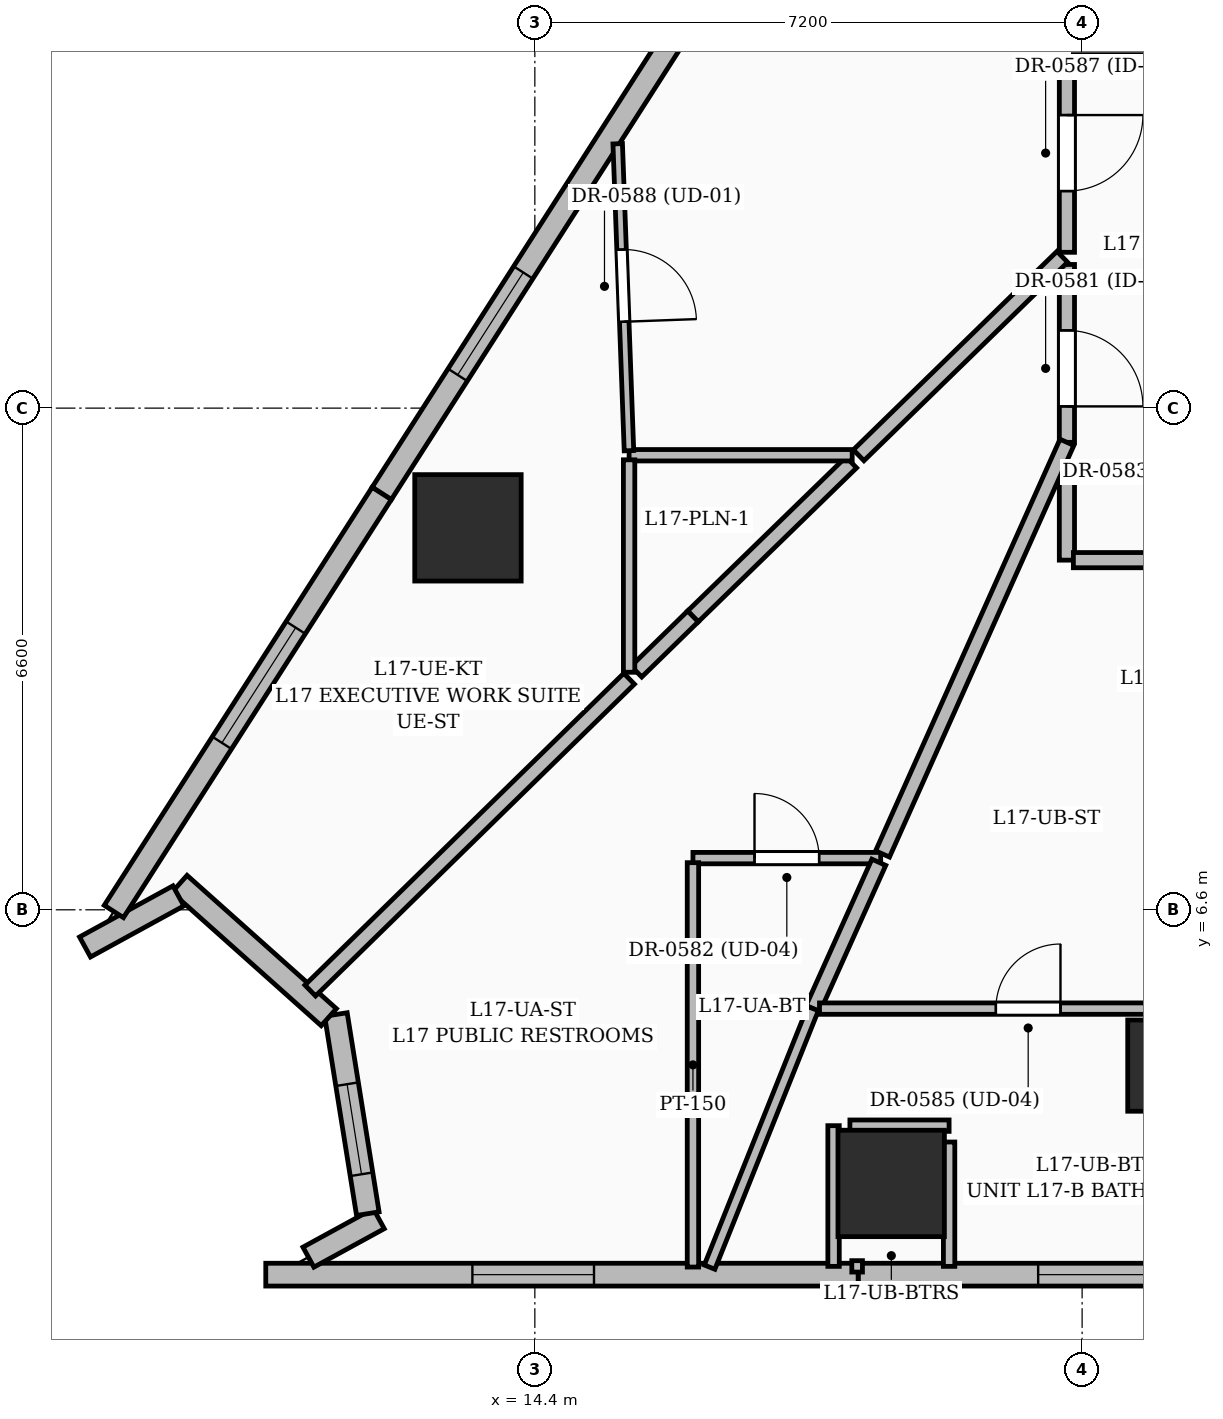
"""IFC4 building model, lengths in metres.
Left out: names, types, materials, properties, quantities, classifications, styles, units other than length and angle.
Written with IfcOpenShell. Run it as: python <this file> out.ifc"""

import sys

from ifc_helpers import new_model, si_unit, direction, frame, frame_2d, origin, origin_2d, place, context, subcontext, project, spatial, rectangle, extrude, element, fill, save


model = new_model("IFC4")
c1 = context("Model", 3, precision=1e-05, world=origin(), true_north=direction((0.0, 1.0)))
c2 = subcontext(c1, "Body", "Model", "MODEL_VIEW")
j1 = project(units=[si_unit("LENGTHUNIT", "METRE"), si_unit("PLANEANGLEUNIT", "RADIAN")], contexts=[c1])
p1 = place(None, origin())
s1 = spatial("IfcSite", under=j1, at=p1, CompositionType="ELEMENT")
p2 = place(p1, origin())
s2 = spatial("IfcBuilding", under=s1, at=p2, CompositionType="ELEMENT")
p3 = place(p2, frame((0.0, 0.0, 71.4)))
s3 = spatial("IfcBuildingStorey", under=s2, at=p3, CompositionType="ELEMENT", Elevation=71.4)
p4 = place(p3, frame((22.8, 4.55, 0.0), z_axis=(0.0, 0.0, 1.0), x_axis=(1.0, 0.0, 0.0)))
e1 = element("IfcColumn", 1, at=p4, inside=s3, PredefinedType="COLUMN", context=c2, shape_type="SweptSolid", body=[
    extrude(rectangle(XDim=1.2, YDim=1.2, at=origin_2d()), origin(), (0.0, 0.0, 1.0), 3.6),
])
for number, where, z_axis, x_axis in (
    (2, (19.088, 3.0, 0.0), (0.0, 0.0, 1.0), (1.0, 0.0, 0.0)),
    (3, (13.52, 11.625, 0.0), (0.0, 0.0, 1.0), (1.0, 0.0, 0.0)),
):
    element("IfcColumn", number, at=place(p3, frame(where, z_axis=z_axis, x_axis=x_axis)), inside=s3, PredefinedType="COLUMN", context=c2, shape_type="SweptSolid", body=[
        extrude(rectangle(XDim=1.4, YDim=1.4, at=origin_2d()), origin(), (0.0, 0.0, 1.0), 3.6),
    ])
p5 = place(p3, frame((26.447, 1.8, 0.0), z_axis=(0.0, 0.0, 1.0), x_axis=(-1.0, 0.0, 0.0)))
e4 = element("IfcWall", 4, at=p5, inside=s3, PredefinedType="SOLIDWALL", context=c2, shape_type="SweptSolid", body=[
    extrude(rectangle(XDim=7.793, YDim=0.3, at=frame_2d((3.897, 0.0))), origin(), (0.0, 0.0, 1.0), 3.35),
])
p6 = place(p5, frame((3.625, 0.0, 0.6)))
e5 = element("IfcOpeningElement", 5, at=p6, cuts=e4, PredefinedType="OPENING", context=c2, shape_type="SweptSolid", body=[
    extrude(rectangle(XDim=1.8, YDim=2.1, at=frame_2d((0.9, 1.05))), frame((0.0, 0.16, 0.0), z_axis=(0.0, -1.0, 0.0), x_axis=(1.0, 0.0, 0.0)), (0.0, 0.0, 1.0), 0.32),
])
p7 = place(p5, frame((0.6, 0.0, 0.55)))
e6 = element("IfcOpeningElement", 6, at=p7, cuts=e4, PredefinedType="OPENING", context=c2, shape_type="SweptSolid", body=[
    extrude(rectangle(XDim=1.6, YDim=2.2, at=frame_2d((0.8, 1.1))), frame((0.0, 0.16, 0.0), z_axis=(0.0, -1.0, 0.0), x_axis=(1.0, 0.0, 0.0)), (0.0, 0.0, 1.0), 0.32),
])
p8 = place(p3, frame((18.653, 1.8, 0.0), z_axis=(0.0, 0.0, 1.0), x_axis=(-1.0, 0.0, 0.0)))
e7 = element("IfcWall", 7, at=p8, inside=s3, PredefinedType="SOLIDWALL", context=c2, shape_type="SweptSolid", body=[
    extrude(rectangle(XDim=7.793, YDim=0.3, at=frame_2d((3.896, 0.0))), origin(), (0.0, 0.0, 1.0), 3.35),
])
p9 = place(p8, frame((3.475, 0.0, 0.55)))
e8 = element("IfcOpeningElement", 8, at=p9, cuts=e7, PredefinedType="OPENING", context=c2, shape_type="SweptSolid", body=[
    extrude(rectangle(XDim=1.6, YDim=2.2, at=frame_2d((0.8, 1.1))), frame((0.0, 0.16, 0.0), z_axis=(0.0, -1.0, 0.0), x_axis=(1.0, 0.0, 0.0)), (0.0, 0.0, 1.0), 0.32),
])
p10 = place(p3, frame((11.421, 2.03, 0.0), z_axis=(0.0, 0.0, 1.0), x_axis=(0.877488347229, 0.479597957124, 0.0)))
e9 = element("IfcWall", 9, at=p10, inside=s3, PredefinedType="SOLIDWALL", context=c2, shape_type="SweptSolid", body=[
    extrude(rectangle(XDim=1.055, YDim=0.3, at=frame_2d((0.527, 0.0))), origin(), (0.0, 0.0, 1.0), 3.35),
])
p11 = place(p3, frame((12.203, 2.602, 0.0), z_axis=(0.0, 0.0, 1.0), x_axis=(-0.158173523246, 0.987411330978, 0.0)))
e10 = element("IfcWall", 10, at=p11, inside=s3, PredefinedType="SOLIDWALL", context=c2, shape_type="SweptSolid", body=[
    extrude(rectangle(XDim=2.653, YDim=0.3, at=frame_2d((1.327, 0.0))), origin(), (0.0, 0.0, 1.0), 3.35),
])
p12 = place(p11, frame((0.525, 0.0, 0.8)))
e11 = element("IfcOpeningElement", 11, at=p12, cuts=e10, PredefinedType="OPENING", context=c2, shape_type="SweptSolid", body=[
    extrude(rectangle(XDim=1.2, YDim=1.8, at=frame_2d((0.6, 0.9))), frame((0.0, 0.16, 0.0), z_axis=(0.0, -1.0, 0.0), x_axis=(1.0, 0.0, 0.0)), (0.0, 0.0, 1.0), 0.32),
])
p13 = place(p3, frame((11.689, 5.187, 0.0), z_axis=(0.0, 0.0, 1.0), x_axis=(-0.745975491387, 0.665973397555, 0.0)))
e12 = element("IfcWall", 12, at=p13, inside=s3, PredefinedType="SOLIDWALL", context=c2, shape_type="SweptSolid", body=[
    extrude(rectangle(XDim=2.634, YDim=0.3, at=frame_2d((1.317, 0.0))), origin(), (0.0, 0.0, 1.0), 3.35),
])
p14 = place(p3, frame((9.711, 6.783, 0.0), z_axis=(0.0, 0.0, 1.0), x_axis=(-0.877215145436, -0.480097478245, 0.0)))
e13 = element("IfcWall", 13, at=p14, inside=s3, PredefinedType="SOLIDWALL", context=c2, shape_type="SweptSolid", body=[
    extrude(rectangle(XDim=1.4, YDim=0.3, at=frame_2d((0.7, 0.0))), origin(), (0.0, 0.0, 1.0), 3.35),
])
p15 = place(p3, frame((8.861, 6.578, 0.0), z_axis=(0.0, 0.0, 1.0), x_axis=(0.539510604495, 0.841978804744, 0.0)))
e14 = element("IfcWall", 14, at=p15, inside=s3, PredefinedType="SOLIDWALL", context=c2, shape_type="SweptSolid", body=[
    extrude(rectangle(XDim=6.534, YDim=0.3, at=frame_2d((3.267, 0.0))), origin(), (0.0, 0.0, 1.0), 3.35),
])
p16 = place(p15, frame((2.635, 0.0, 0.6)))
e15 = element("IfcOpeningElement", 15, at=p16, cuts=e14, PredefinedType="OPENING", context=c2, shape_type="SweptSolid", body=[
    extrude(rectangle(XDim=1.8, YDim=2.1, at=frame_2d((0.9, 1.05))), frame((0.0, 0.16, 0.0), z_axis=(0.0, -1.0, 0.0), x_axis=(1.0, 0.0, 0.0)), (0.0, 0.0, 1.0), 0.32),
])
p17 = place(p3, frame((12.386, 12.079, 0.0), z_axis=(0.0, 0.0, 1.0), x_axis=(0.539509086386, 0.841979777493, 0.0)))
e16 = element("IfcWall", 16, at=p17, inside=s3, PredefinedType="SOLIDWALL", context=c2, shape_type="SweptSolid", body=[
    extrude(rectangle(XDim=7.149, YDim=0.3, at=frame_2d((3.574, 0.0))), origin(), (0.0, 0.0, 1.0), 3.35),
])
p18 = place(p17, frame((1.85, 0.0, 0.55)))
e17 = element("IfcOpeningElement", 17, at=p18, cuts=e16, PredefinedType="OPENING", context=c2, shape_type="SweptSolid", body=[
    extrude(rectangle(XDim=1.6, YDim=2.2, at=frame_2d((0.8, 1.1))), frame((0.0, 0.16, 0.0), z_axis=(0.0, -1.0, 0.0), x_axis=(1.0, 0.0, 0.0)), (0.0, 0.0, 1.0), 0.32),
])
p19 = place(p3, frame((21.4, 15.09, 0.0), z_axis=(0.0, 0.0, 1.0), x_axis=(0.0, -1.0, 0.0)))
e18 = element("IfcWall", 18, at=p19, inside=s3, PredefinedType="PARTITIONING", context=c2, shape_type="SweptSolid", body=[
    extrude(rectangle(XDim=2.34, YDim=0.2, at=frame_2d((1.17, 0.0))), origin(), (0.0, 0.0, 1.0), 2.86),
])
p20 = place(p19, frame((0.867, 0.0, 0.0)))
e19 = element("IfcOpeningElement", 19, at=p20, cuts=e18, PredefinedType="OPENING", context=c2, shape_type="SweptSolid", body=[
    extrude(rectangle(XDim=1.0, YDim=2.2, at=frame_2d((0.5, 1.1))), frame((0.0, 0.11, 0.0), z_axis=(0.0, -1.0, 0.0), x_axis=(1.0, 0.0, 0.0)), (0.0, 0.0, 1.0), 0.22),
])
p21 = place(p3, frame((21.4, 12.261, 0.0), z_axis=(0.0, 0.0, 1.0), x_axis=(0.0, -1.0, 0.0)))
e20 = element("IfcWall", 20, at=p21, inside=s3, PredefinedType="PARTITIONING", context=c2, shape_type="SweptSolid", body=[
    extrude(rectangle(XDim=1.061, YDim=0.2, at=frame_2d((0.53, 0.0))), origin(), (0.0, 0.0, 1.0), 3.35),
])
p22 = place(p3, frame((21.485, 11.2, 0.0), z_axis=(0.0, 0.0, 1.0), x_axis=(1.0, 0.0, 0.0)))
e21 = element("IfcWall", 21, at=p22, inside=s3, PredefinedType="PARTITIONING", context=c2, shape_type="SweptSolid", body=[
    extrude(rectangle(XDim=3.384, YDim=0.2, at=frame_2d((1.692, 0.0))), origin(), (0.0, 0.0, 1.0), 2.86),
])
p23 = place(p22, frame((1.25, 0.0, 0.0)))
e22 = element("IfcOpeningElement", 22, at=p23, cuts=e21, PredefinedType="OPENING", context=c2, shape_type="SweptSolid", body=[
    extrude(rectangle(XDim=1.0, YDim=2.2, at=frame_2d((0.5, 1.1))), frame((0.0, 0.11, 0.0), z_axis=(0.0, -1.0, 0.0), x_axis=(1.0, 0.0, 0.0)), (0.0, 0.0, 1.0), 0.22),
])
p24 = place(p3, frame((21.4, 17.75, 0.0), z_axis=(0.0, 0.0, 1.0), x_axis=(0.0, -1.0, 0.0)))
e23 = element("IfcWall", 23, at=p24, inside=s3, PredefinedType="PARTITIONING", context=c2, shape_type="SweptSolid", body=[
    extrude(rectangle(XDim=2.5, YDim=0.2, at=frame_2d((1.25, 0.0))), origin(), (0.0, 0.0, 1.0), 3.35),
])
p25 = place(p24, frame((0.695, 0.0, 0.0)))
e24 = element("IfcOpeningElement", 24, at=p25, cuts=e23, PredefinedType="OPENING", context=c2, shape_type="SweptSolid", body=[
    extrude(rectangle(XDim=1.0, YDim=2.2, at=frame_2d((0.5, 1.1))), frame((0.0, 0.11, 0.0), z_axis=(0.0, -1.0, 0.0), x_axis=(1.0, 0.0, 0.0)), (0.0, 0.0, 1.0), 0.22),
])
p26 = place(p3, frame((27.73, 17.75, 0.0), z_axis=(0.0, 0.0, 1.0), x_axis=(-1.0, 0.0, 0.0)))
e25 = element("IfcWall", 25, at=p26, inside=s3, PredefinedType="PARTITIONING", context=c2, shape_type="SweptSolid", body=[
    extrude(rectangle(XDim=6.245, YDim=0.2, at=frame_2d((3.123, 0.0))), origin(), (0.0, 0.0, 1.0), 1.12),
])
p27 = place(p3, frame((16.48, 7.28, 0.0), z_axis=(0.0, 0.0, 1.0), x_axis=(1.0, 0.0, 0.0)))
e26 = element("IfcWall", 26, at=p27, inside=s3, PredefinedType="PARTITIONING", context=c2, shape_type="SweptSolid", body=[
    extrude(rectangle(XDim=2.47, YDim=0.15, at=frame_2d((1.235, 0.0))), origin(), (0.0, 0.0, 1.0), 2.37),
])
p28 = place(p27, frame((0.81, 0.0, 0.0)))
e27 = element("IfcOpeningElement", 27, at=p28, cuts=e26, PredefinedType="OPENING", context=c2, shape_type="SweptSolid", body=[
    extrude(rectangle(XDim=0.85, YDim=2.1, at=frame_2d((0.425, 1.05))), frame((0.0, 0.085, 0.0), z_axis=(0.0, -1.0, 0.0), x_axis=(1.0, 0.0, 0.0)), (0.0, 0.0, 1.0), 0.17),
])
p29 = place(p3, frame((18.975, 7.335, 0.0), z_axis=(0.0, 0.0, 1.0), x_axis=(0.408740443591, 0.912650672367, 0.0)))
e28 = element("IfcWall", 28, at=p29, inside=s3, PredefinedType="PARTITIONING", context=c2, shape_type="SweptSolid", body=[
    extrude(rectangle(XDim=5.934, YDim=0.2, at=frame_2d((2.967, 0.0))), origin(), (0.0, 0.0, 1.0), 1.12),
])
p30 = place(p3, frame((21.339, 15.191, 0.0), z_axis=(0.0, 0.0, 1.0), x_axis=(-0.716217041319, -0.697877603684, 0.0)))
e29 = element("IfcWall", 29, at=p30, inside=s3, PredefinedType="PARTITIONING", context=c2, shape_type="SweptSolid", body=[
    extrude(rectangle(XDim=3.741, YDim=0.2, at=frame_2d((1.87, 0.0))), origin(), (0.0, 0.0, 1.0), 3.35),
])
p31 = place(p3, frame((18.563, 12.486, 0.0), z_axis=(0.0, 0.0, 1.0), x_axis=(-0.716909764219, -0.697165970173, 0.0)))
e30 = element("IfcWall", 30, at=p31, inside=s3, PredefinedType="PARTITIONING", context=c2, shape_type="SweptSolid", body=[
    extrude(rectangle(XDim=2.906, YDim=0.2, at=frame_2d((1.453, 0.0))), origin(), (0.0, 0.0, 1.0), 1.12),
])
p32 = place(p3, frame((16.48, 7.22, 0.0), z_axis=(0.0, 0.0, 1.0), x_axis=(0.0, -1.0, 0.0)))
e31 = element("IfcWall", 31, at=p32, inside=s3, PredefinedType="PARTITIONING", context=c2, shape_type="SweptSolid", body=[
    extrude(rectangle(XDim=5.32, YDim=0.15, at=frame_2d((2.66, 0.0))), origin(), (0.0, 0.0, 1.0), 2.37),
])
p33 = place(p3, frame((18.06, 5.3, 0.0), z_axis=(0.0, 0.0, 1.0), x_axis=(0.409912552127, 0.912124826769, 0.0)))
e32 = element("IfcWall", 32, at=p33, inside=s3, PredefinedType="PARTITIONING", context=c2, shape_type="SweptSolid", body=[
    extrude(rectangle(XDim=2.111, YDim=0.2, at=frame_2d((1.055, 0.0))), origin(), (0.0, 0.0, 1.0), 3.35),
])
p34 = place(p3, frame((16.48, 10.46, 0.0), z_axis=(0.0, 0.0, 1.0), x_axis=(-0.715632941053, -0.69847655199, 0.0)))
e33 = element("IfcWall", 33, at=p34, inside=s3, PredefinedType="PARTITIONING", context=c2, shape_type="SweptSolid", body=[
    extrude(rectangle(XDim=1.039, YDim=0.2, at=frame_2d((0.52, 0.0))), origin(), (0.0, 0.0, 1.0), 1.12),
])
p35 = place(p3, frame((15.64, 9.64, 0.0), z_axis=(0.0, 0.0, 1.0), x_axis=(-0.714989565671, -0.69913512355, 0.0)))
e34 = element("IfcWall", 34, at=p35, inside=s3, PredefinedType="PARTITIONING", context=c2, shape_type="SweptSolid", body=[
    extrude(rectangle(XDim=5.867, YDim=0.2, at=frame_2d((2.934, 0.0))), origin(), (0.0, 0.0, 1.0), 2.37),
])
p36 = place(p3, frame((18.145, 5.3, 0.0), z_axis=(0.0, 0.0, 1.0), x_axis=(1.0, 0.0, 0.0)))
e35 = element("IfcWall", 35, at=p36, inside=s3, PredefinedType="PARTITIONING", context=c2, shape_type="SweptSolid", body=[
    extrude(rectangle(XDim=5.695, YDim=0.15, at=frame_2d((2.848, 0.0))), origin(), (0.0, 0.0, 1.0), 3.35),
])
p37 = place(p36, frame((2.32, 0.0, 0.0)))
e36 = element("IfcOpeningElement", 36, at=p37, cuts=e35, PredefinedType="OPENING", context=c2, shape_type="SweptSolid", body=[
    extrude(rectangle(XDim=0.85, YDim=2.1, at=frame_2d((0.425, 1.05))), frame((0.0, 0.085, 0.0), z_axis=(0.0, -1.0, 0.0), x_axis=(1.0, 0.0, 0.0)), (0.0, 0.0, 1.0), 0.17),
])
p38 = place(p3, frame((15.64, 12.58, 0.0), z_axis=(0.0, 0.0, 1.0), x_axis=(1.0, 0.0, 0.0)))
e37 = element("IfcWall", 37, at=p38, inside=s3, PredefinedType="PARTITIONING", context=c2, shape_type="SweptSolid", body=[
    extrude(rectangle(XDim=2.935, YDim=0.15, at=frame_2d((1.468, 0.0))), origin(), (0.0, 0.0, 1.0), 3.35),
])
p39 = place(p3, frame((15.49, 16.678, 0.0), z_axis=(0.0, 0.0, 1.0), x_axis=(0.036674223431, -0.999327274388, 0.0)))
e38 = element("IfcWall", 38, at=p39, inside=s3, PredefinedType="PARTITIONING", context=c2, shape_type="SweptSolid", body=[
    extrude(rectangle(XDim=4.041, YDim=0.125, at=frame_2d((2.021, 0.0))), origin(), (0.0, 0.0, 1.0), 2.37),
])
p40 = place(p39, frame((1.393, 0.0, 0.0)))
e39 = element("IfcOpeningElement", 39, at=p40, cuts=e38, PredefinedType="OPENING", context=c2, shape_type="SweptSolid", body=[
    extrude(rectangle(XDim=0.95, YDim=2.2, at=frame_2d((0.475, 1.1))), frame((0.0, 0.072, 0.0), z_axis=(0.0, -1.0, 0.0), x_axis=(1.0, 0.0, 0.0)), (0.0, 0.0, 1.0), 0.145),
])
p41 = place(p3, frame((15.64, 12.52, 0.0), z_axis=(0.0, 0.0, 1.0), x_axis=(0.0, -1.0, 0.0)))
e40 = element("IfcWall", 40, at=p41, inside=s3, PredefinedType="PARTITIONING", context=c2, shape_type="SweptSolid", body=[
    extrude(rectangle(XDim=2.795, YDim=0.15, at=frame_2d((1.397, 0.0))), origin(), (0.0, 0.0, 1.0), 1.12),
])
p42 = place(p3, frame((18.71, 1.909, 0.0), z_axis=(0.0, 0.0, 1.0), x_axis=(-1.0, 0.0, 0.0)))
e41 = element("IfcWall", 41, at=p42, inside=s3, PredefinedType="PARTITIONING", context=c2, shape_type="SweptSolid", body=[
    extrude(rectangle(XDim=0.14, YDim=0.15, at=frame_2d((0.07, 0.0))), origin(), (0.0, 0.0, 1.0), 3.35),
])
p43 = place(p3, frame((18.33, 1.909, 0.0), z_axis=(0.0, 0.0, 1.0), x_axis=(0.0, 1.0, 0.0)))
e42 = element("IfcWall", 42, at=p43, inside=s3, PredefinedType="PARTITIONING", context=c2, shape_type="SweptSolid", body=[
    extrude(rectangle(XDim=1.851, YDim=0.15, at=frame_2d((0.926, 0.0))), origin(), (0.0, 0.0, 1.0), 2.37),
])
p44 = place(p3, frame((18.545, 3.76, 0.0), z_axis=(0.0, 0.0, 1.0), x_axis=(1.0, 0.0, 0.0)))
e43 = element("IfcWall", 43, at=p44, inside=s3, PredefinedType="PARTITIONING", context=c2, shape_type="SweptSolid", body=[
    extrude(rectangle(XDim=1.305, YDim=0.15, at=frame_2d((0.653, 0.0))), origin(), (0.0, 0.0, 1.0), 2.37),
])
p45 = place(p3, frame((19.85, 3.545, 0.0), z_axis=(0.0, 0.0, 1.0), x_axis=(0.0, -1.0, 0.0)))
e44 = element("IfcWall", 44, at=p45, inside=s3, PredefinedType="PARTITIONING", context=c2, shape_type="SweptSolid", body=[
    extrude(rectangle(XDim=1.636, YDim=0.15, at=frame_2d((0.818, 0.0))), origin(), (0.0, 0.0, 1.0), 1.12),
])
p46 = place(p3, frame((18.06, 5.3, 0.0), z_axis=(0.0, 0.0, 1.0), x_axis=(-0.371540045928, -0.928416929117, 0.0)))
e45 = element("IfcWall", 45, at=p46, inside=s3, PredefinedType="PARTITIONING", context=c2, shape_type="SweptSolid", body=[
    extrude(rectangle(XDim=3.663, YDim=0.15, at=frame_2d((1.832, 0.0))), origin(), (0.0, 0.0, 1.0), 2.37),
])
p47 = place(p6, origin())
e46 = element("IfcWindow", 46, at=p47, inside=s3, PartitioningType="SINGLE_PANEL", PredefinedType="WINDOW", context=c2, shape_type="SweptSolid", body=[
    extrude(rectangle(XDim=1.8, YDim=2.1, at=frame_2d((0.9, 1.05))), frame((0.0, 0.03, 0.0), z_axis=(0.0, -1.0, 0.0), x_axis=(1.0, 0.0, 0.0)), (0.0, 0.0, 1.0), 0.06),
])
fill(e5, e46)
p48 = place(p9, origin())
e47 = element("IfcWindow", 47, at=p48, inside=s3, PartitioningType="SINGLE_PANEL", PredefinedType="WINDOW", context=c2, shape_type="SweptSolid", body=[
    extrude(rectangle(XDim=1.6, YDim=2.2, at=frame_2d((0.8, 1.1))), frame((0.0, 0.03, 0.0), z_axis=(0.0, -1.0, 0.0), x_axis=(1.0, 0.0, 0.0)), (0.0, 0.0, 1.0), 0.06),
])
fill(e8, e47)
p49 = place(p12, origin())
e48 = element("IfcWindow", 48, at=p49, inside=s3, PartitioningType="SINGLE_PANEL", PredefinedType="WINDOW", context=c2, shape_type="SweptSolid", body=[
    extrude(rectangle(XDim=1.2, YDim=1.8, at=frame_2d((0.6, 0.9))), frame((0.0, 0.03, 0.0), z_axis=(0.0, -1.0, 0.0), x_axis=(1.0, 0.0, 0.0)), (0.0, 0.0, 1.0), 0.06),
])
fill(e11, e48)
p50 = place(p16, origin())
e49 = element("IfcWindow", 49, at=p50, inside=s3, PartitioningType="SINGLE_PANEL", PredefinedType="WINDOW", context=c2, shape_type="SweptSolid", body=[
    extrude(rectangle(XDim=1.8, YDim=2.1, at=frame_2d((0.9, 1.05))), frame((0.0, 0.03, 0.0), z_axis=(0.0, -1.0, 0.0), x_axis=(1.0, 0.0, 0.0)), (0.0, 0.0, 1.0), 0.06),
])
fill(e15, e49)
p51 = place(p18, origin())
e50 = element("IfcWindow", 50, at=p51, inside=s3, PartitioningType="SINGLE_PANEL", PredefinedType="WINDOW", context=c2, shape_type="SweptSolid", body=[
    extrude(rectangle(XDim=1.6, YDim=2.2, at=frame_2d((0.8, 1.1))), frame((0.0, 0.03, 0.0), z_axis=(0.0, -1.0, 0.0), x_axis=(1.0, 0.0, 0.0)), (0.0, 0.0, 1.0), 0.06),
])
fill(e17, e50)
p52 = place(p20, origin())
e51 = element("IfcDoor", 51, at=p52, inside=s3, OperationType="SINGLE_SWING_RIGHT", PredefinedType="DOOR", context=c2, shape_type="SweptSolid", body=[
    extrude(rectangle(XDim=1.0, YDim=2.2, at=frame_2d((0.5, 1.1))), frame((0.0, 0.025, 0.0), z_axis=(0.0, -1.0, 0.0), x_axis=(1.0, 0.0, 0.0)), (0.0, 0.0, 1.0), 0.05),
])
fill(e19, e51)
p53 = place(p28, origin())
e52 = element("IfcDoor", 52, at=p53, inside=s3, OperationType="SINGLE_SWING_LEFT", PredefinedType="DOOR", context=c2, shape_type="SweptSolid", body=[
    extrude(rectangle(XDim=0.85, YDim=2.1, at=frame_2d((0.425, 1.05))), frame((0.0, 0.025, 0.0), z_axis=(0.0, -1.0, 0.0), x_axis=(1.0, 0.0, 0.0)), (0.0, 0.0, 1.0), 0.05),
])
fill(e27, e52)
p54 = place(p37, origin())
e53 = element("IfcDoor", 53, at=p54, inside=s3, OperationType="SINGLE_SWING_RIGHT", PredefinedType="DOOR", context=c2, shape_type="SweptSolid", body=[
    extrude(rectangle(XDim=0.85, YDim=2.1, at=frame_2d((0.425, 1.05))), frame((0.0, 0.025, 0.0), z_axis=(0.0, -1.0, 0.0), x_axis=(1.0, 0.0, 0.0)), (0.0, 0.0, 1.0), 0.05),
])
fill(e36, e53)
p55 = place(p25, origin())
e54 = element("IfcDoor", 54, at=p55, inside=s3, OperationType="SINGLE_SWING_LEFT", PredefinedType="DOOR", context=c2, shape_type="SweptSolid", body=[
    extrude(rectangle(XDim=1.0, YDim=2.2, at=frame_2d((0.5, 1.1))), frame((0.0, 0.025, 0.0), z_axis=(0.0, -1.0, 0.0), x_axis=(1.0, 0.0, 0.0)), (0.0, 0.0, 1.0), 0.05),
])
fill(e24, e54)
p56 = place(p40, origin())
e55 = element("IfcDoor", 55, at=p56, inside=s3, OperationType="SINGLE_SWING_RIGHT", PredefinedType="DOOR", context=c2, shape_type="SweptSolid", body=[
    extrude(rectangle(XDim=0.95, YDim=2.2, at=frame_2d((0.475, 1.1))), frame((0.0, 0.025, 0.0), z_axis=(0.0, -1.0, 0.0), x_axis=(1.0, 0.0, 0.0)), (0.0, 0.0, 1.0), 0.05),
])
fill(e39, e55)
save(model, sys.argv[1])
